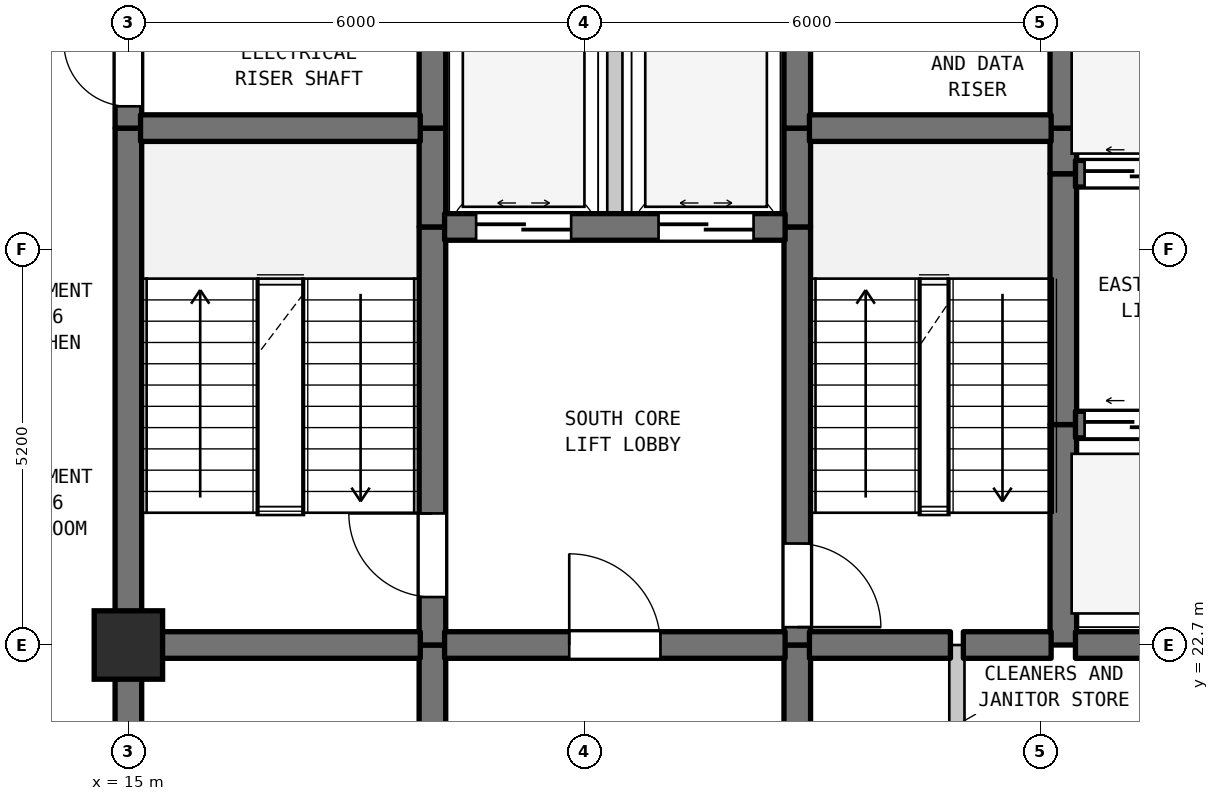
"""IFC4 building model, lengths in metres.
Left out: names, types, materials, properties, quantities, classifications, styles, units other than length and angle.
Written with IfcOpenShell. Run it as: python <this file> out.ifc"""

import sys

from ifc_helpers import new_model, si_unit, direction, frame, frame_2d, origin, origin_2d, place, context, subcontext, project, spatial, rectangle, extrude, element, fill, save


model = new_model("IFC4")
c1 = context("Model", 3, precision=1e-05, world=origin(), true_north=direction((0.0, 1.0)))
c2 = subcontext(c1, "Body", "Model", "MODEL_VIEW")
j1 = project(units=[si_unit("LENGTHUNIT", "METRE"), si_unit("PLANEANGLEUNIT", "RADIAN")], contexts=[c1])
p1 = place(None, origin())
s1 = spatial("IfcSite", under=j1, at=p1, CompositionType="ELEMENT")
p2 = place(p1, origin())
s2 = spatial("IfcBuilding", under=s1, at=p2, CompositionType="ELEMENT")
p3 = place(p2, frame((0.0, 0.0, 164.6)))
s3 = spatial("IfcBuildingStorey", under=s2, at=p3, CompositionType="ELEMENT", Elevation=164.6)
p4 = place(p3, frame((15.0, 22.7, 0.0), z_axis=(0.0, 0.0, 1.0), x_axis=(1.0, 0.0, 0.0)))
e1 = element("IfcColumn", 1, at=p4, inside=s3, PredefinedType="COLUMN", context=c2, shape_type="SweptSolid", body=[
    extrude(rectangle(XDim=0.9, YDim=0.9, at=origin_2d()), origin(), (0.0, 0.0, 1.0), 4.5),
])
p5 = place(p3, frame((15.0, 19.5, 0.0), z_axis=(0.0, 0.0, 1.0), x_axis=(0.0, 1.0, 0.0)))
e2 = element("IfcWall", 2, at=p5, inside=s3, PredefinedType="SHEAR", context=c2, shape_type="SweptSolid", body=[
    extrude(rectangle(XDim=3.2, YDim=0.35, at=frame_2d((1.6, 0.0))), origin(), (0.0, 0.0, 1.0), 4.19),
])
p6 = place(p3, frame((15.0, 22.7, 0.0), z_axis=(0.0, 0.0, 1.0), x_axis=(0.0, 1.0, 0.0)))
e3 = element("IfcWall", 3, at=p6, inside=s3, PredefinedType="SHEAR", context=c2, shape_type="SweptSolid", body=[
    extrude(rectangle(XDim=6.8, YDim=0.35, at=frame_2d((3.4, 0.0))), origin(), (0.0, 0.0, 1.0), 4.19),
])
p7 = place(p3, frame((15.0, 29.5, 0.0), z_axis=(0.0, 0.0, 1.0), x_axis=(0.0, 1.0, 0.0)))
e4 = element("IfcWall", 4, at=p7, inside=s3, PredefinedType="SHEAR", context=c2, shape_type="SweptSolid", body=[
    extrude(rectangle(XDim=1.6, YDim=0.35, at=frame_2d((0.8, 0.0))), origin(), (0.0, 0.0, 1.0), 4.19),
])
p8 = place(p7, frame((0.287, 0.0, 0.0)))
e5 = element("IfcOpeningElement", 5, at=p8, cuts=e4, PredefinedType="OPENING", context=c2, shape_type="SweptSolid", body=[
    extrude(rectangle(XDim=0.85, YDim=2.1, at=frame_2d((0.425, 1.05))), frame((0.0, 0.185, 0.0), z_axis=(0.0, -1.0, 0.0), x_axis=(1.0, 0.0, 0.0)), (0.0, 0.0, 1.0), 0.37),
])
p9 = place(p3, frame((19.0, 19.5, 0.0), z_axis=(0.0, 0.0, 1.0), x_axis=(0.0, 1.0, 0.0)))
e6 = element("IfcWall", 6, at=p9, inside=s3, PredefinedType="SHEAR", context=c2, shape_type="SweptSolid", body=[
    extrude(rectangle(XDim=3.2, YDim=0.35, at=frame_2d((1.6, 0.0))), origin(), (0.0, 0.0, 1.0), 4.19),
])
p10 = place(p3, frame((19.0, 22.7, 0.0), z_axis=(0.0, 0.0, 1.0), x_axis=(0.0, 1.0, 0.0)))
e7 = element("IfcWall", 7, at=p10, inside=s3, PredefinedType="SHEAR", context=c2, shape_type="SweptSolid", body=[
    extrude(rectangle(XDim=5.5, YDim=0.35, at=frame_2d((2.75, 0.0))), origin(), (0.0, 0.0, 1.0), 4.19),
])
p11 = place(p10, frame((0.631, 0.0, 0.0)))
e8 = element("IfcOpeningElement", 8, at=p11, cuts=e7, PredefinedType="OPENING", context=c2, shape_type="SweptSolid", body=[
    extrude(rectangle(XDim=1.1, YDim=2.15, at=frame_2d((0.55, 1.075))), frame((0.0, 0.185, 0.0), z_axis=(0.0, -1.0, 0.0), x_axis=(1.0, 0.0, 0.0)), (0.0, 0.0, 1.0), 0.37),
])
p12 = place(p3, frame((19.0, 28.2, 0.0), z_axis=(0.0, 0.0, 1.0), x_axis=(0.0, 1.0, 0.0)))
e9 = element("IfcWall", 9, at=p12, inside=s3, PredefinedType="SHEAR", context=c2, shape_type="SweptSolid", body=[
    extrude(rectangle(XDim=1.3, YDim=0.35, at=frame_2d((0.65, 0.0))), origin(), (0.0, 0.0, 1.0), 4.19),
])
p13 = place(p3, frame((19.0, 29.5, 0.0), z_axis=(0.0, 0.0, 1.0), x_axis=(0.0, 1.0, 0.0)))
e10 = element("IfcWall", 10, at=p13, inside=s3, PredefinedType="SHEAR", context=c2, shape_type="SweptSolid", body=[
    extrude(rectangle(XDim=5.5, YDim=0.35, at=frame_2d((2.75, 0.0))), origin(), (0.0, 0.0, 1.0), 4.19),
])
p14 = place(p13, frame((2.025, 0.0, 0.0)))
e11 = element("IfcOpeningElement", 11, at=p14, cuts=e10, PredefinedType="OPENING", context=c2, shape_type="SweptSolid", body=[
    extrude(rectangle(XDim=1.1, YDim=2.15, at=frame_2d((0.55, 1.075))), frame((0.0, 0.185, 0.0), z_axis=(0.0, -1.0, 0.0), x_axis=(1.0, 0.0, 0.0)), (0.0, 0.0, 1.0), 0.37),
])
p15 = place(p3, frame((21.4, 28.2, 0.0), z_axis=(0.0, 0.0, 1.0), x_axis=(0.0, 1.0, 0.0)))
e12 = element("IfcWall", 12, at=p15, inside=s3, PredefinedType="STANDARD", context=c2, shape_type="SweptSolid", body=[
    extrude(rectangle(XDim=2.6, YDim=0.2, at=frame_2d((1.3, 0.0))), origin(), (0.0, 0.0, 1.0), 4.19),
])
p16 = place(p3, frame((23.8, 19.5, 0.0), z_axis=(0.0, 0.0, 1.0), x_axis=(0.0, 1.0, 0.0)))
e13 = element("IfcWall", 13, at=p16, inside=s3, PredefinedType="SHEAR", context=c2, shape_type="SweptSolid", body=[
    extrude(rectangle(XDim=3.2, YDim=0.35, at=frame_2d((1.6, 0.0))), origin(), (0.0, 0.0, 1.0), 4.19),
])
p17 = place(p3, frame((23.8, 22.7, 0.0), z_axis=(0.0, 0.0, 1.0), x_axis=(0.0, 1.0, 0.0)))
e14 = element("IfcWall", 14, at=p17, inside=s3, PredefinedType="SHEAR", context=c2, shape_type="SweptSolid", body=[
    extrude(rectangle(XDim=5.5, YDim=0.35, at=frame_2d((2.75, 0.0))), origin(), (0.0, 0.0, 1.0), 4.19),
])
p18 = place(p17, frame((0.235, 0.0, 0.0)))
e15 = element("IfcOpeningElement", 15, at=p18, cuts=e14, PredefinedType="OPENING", context=c2, shape_type="SweptSolid", body=[
    extrude(rectangle(XDim=1.1, YDim=2.15, at=frame_2d((0.55, 1.075))), frame((0.0, 0.185, 0.0), z_axis=(0.0, -1.0, 0.0), x_axis=(1.0, 0.0, 0.0)), (0.0, 0.0, 1.0), 0.37),
])
for number, where, z_axis, x_axis in (
    (16, (23.8, 28.2, 0.0), (0.0, 0.0, 1.0), (0.0, 1.0, 0.0)),
    (17, (23.8, 29.5, 0.0), (0.0, 0.0, 1.0), (0.0, 1.0, 0.0)),
):
    element("IfcWall", number, at=place(p3, frame(where, z_axis=z_axis, x_axis=x_axis)), inside=s3, PredefinedType="SHEAR", context=c2, shape_type="SweptSolid", body=[
        extrude(rectangle(XDim=1.3, YDim=0.35, at=frame_2d((0.65, 0.0))), origin(), (0.0, 0.0, 1.0), 4.19),
    ])
p19 = place(p3, frame((25.9, 19.5, 0.0), z_axis=(0.0, 0.0, 1.0), x_axis=(0.0, 1.0, 0.0)))
e18 = element("IfcWall", 18, at=p19, inside=s3, PredefinedType="STANDARD", context=c2, shape_type="SweptSolid", body=[
    extrude(rectangle(XDim=3.2, YDim=0.2, at=frame_2d((1.6, 0.0))), origin(), (0.0, 0.0, 1.0), 4.19),
])
p20 = place(p3, frame((27.3, 22.7, 0.0), z_axis=(0.0, 0.0, 1.0), x_axis=(0.0, 1.0, 0.0)))
e19 = element("IfcWall", 19, at=p20, inside=s3, PredefinedType="SHEAR", context=c2, shape_type="SweptSolid", body=[
    extrude(rectangle(XDim=2.9, YDim=0.35, at=frame_2d((1.45, 0.0))), origin(), (0.0, 0.0, 1.0), 4.19),
])
p21 = place(p3, frame((27.3, 25.6, 0.0), z_axis=(0.0, 0.0, 1.0), x_axis=(0.0, 1.0, 0.0)))
e20 = element("IfcWall", 20, at=p21, inside=s3, PredefinedType="SHEAR", context=c2, shape_type="SweptSolid", body=[
    extrude(rectangle(XDim=3.3, YDim=0.35, at=frame_2d((1.65, 0.0))), origin(), (0.0, 0.0, 1.0), 4.19),
])
p22 = place(p3, frame((27.3, 28.9, 0.0), z_axis=(0.0, 0.0, 1.0), x_axis=(0.0, 1.0, 0.0)))
e21 = element("IfcWall", 21, at=p22, inside=s3, PredefinedType="SHEAR", context=c2, shape_type="SweptSolid", body=[
    extrude(rectangle(XDim=0.6, YDim=0.35, at=frame_2d((0.3, 0.0))), origin(), (0.0, 0.0, 1.0), 4.19),
])
p23 = place(p3, frame((27.3, 29.5, 0.0), z_axis=(0.0, 0.0, 1.0), x_axis=(0.0, 1.0, 0.0)))
e22 = element("IfcWall", 22, at=p23, inside=s3, PredefinedType="SHEAR", context=c2, shape_type="SweptSolid", body=[
    extrude(rectangle(XDim=2.0, YDim=0.35, at=frame_2d((1.0, 0.0))), origin(), (0.0, 0.0, 1.0), 4.19),
])
p24 = place(p3, frame((15.16, 22.7, 0.0), z_axis=(0.0, 0.0, 1.0), x_axis=(1.0, 0.0, 0.0)))
e23 = element("IfcWall", 23, at=p24, inside=s3, PredefinedType="SHEAR", context=c2, shape_type="SweptSolid", body=[
    extrude(rectangle(XDim=3.68, YDim=0.35, at=frame_2d((1.84, 0.0))), origin(), (0.0, 0.0, 1.0), 4.19),
])
p25 = place(p3, frame((19.16, 22.7, 0.0), z_axis=(0.0, 0.0, 1.0), x_axis=(1.0, 0.0, 0.0)))
e24 = element("IfcWall", 24, at=p25, inside=s3, PredefinedType="SHEAR", context=c2, shape_type="SweptSolid", body=[
    extrude(rectangle(XDim=4.48, YDim=0.35, at=frame_2d((2.24, 0.0))), origin(), (0.0, 0.0, 1.0), 4.19),
])
p26 = place(p25, frame((1.64, 0.0, 0.0)))
e25 = element("IfcOpeningElement", 25, at=p26, cuts=e24, PredefinedType="OPENING", context=c2, shape_type="SweptSolid", body=[
    extrude(rectangle(XDim=1.2, YDim=2.2, at=frame_2d((0.6, 1.1))), frame((0.0, 0.185, 0.0), z_axis=(0.0, -1.0, 0.0), x_axis=(1.0, 0.0, 0.0)), (0.0, 0.0, 1.0), 0.37),
])
p27 = place(p3, frame((23.96, 22.7, 0.0), z_axis=(0.0, 0.0, 1.0), x_axis=(1.0, 0.0, 0.0)))
e26 = element("IfcWall", 26, at=p27, inside=s3, PredefinedType="SHEAR", context=c2, shape_type="SweptSolid", body=[
    extrude(rectangle(XDim=1.855, YDim=0.35, at=frame_2d((0.927, 0.0))), origin(), (0.0, 0.0, 1.0), 4.19),
])
p28 = place(p3, frame((25.985, 22.7, 0.0), z_axis=(0.0, 0.0, 1.0), x_axis=(1.0, 0.0, 0.0)))
e27 = element("IfcWall", 27, at=p28, inside=s3, PredefinedType="SHEAR", context=c2, shape_type="SweptSolid", body=[
    extrude(rectangle(XDim=1.155, YDim=0.35, at=frame_2d((0.577, 0.0))), origin(), (0.0, 0.0, 1.0), 4.19),
])
p29 = place(p3, frame((27.46, 22.7, 0.0), z_axis=(0.0, 0.0, 1.0), x_axis=(1.0, 0.0, 0.0)))
e28 = element("IfcWall", 28, at=p29, inside=s3, PredefinedType="SHEAR", context=c2, shape_type="SweptSolid", body=[
    extrude(rectangle(XDim=3.18, YDim=0.35, at=frame_2d((1.59, 0.0))), origin(), (0.0, 0.0, 1.0), 4.19),
])
p30 = place(p3, frame((27.46, 25.6, 0.0), z_axis=(0.0, 0.0, 1.0), x_axis=(1.0, 0.0, 0.0)))
e29 = element("IfcWall", 29, at=p30, inside=s3, PredefinedType="SHEAR", context=c2, shape_type="SweptSolid", body=[
    extrude(rectangle(XDim=3.18, YDim=0.35, at=frame_2d((1.59, 0.0))), origin(), (0.0, 0.0, 1.0), 4.19),
])
p31 = place(p30, frame((0.12, 0.0, 0.0)))
e30 = element("IfcOpeningElement", 30, at=p31, cuts=e29, PredefinedType="OPENING", context=c2, shape_type="SweptSolid", body=[
    extrude(rectangle(XDim=1.25, YDim=2.2, at=frame_2d((0.625, 1.1))), frame((0.0, 0.185, 0.0), z_axis=(0.0, -1.0, 0.0), x_axis=(1.0, 0.0, 0.0)), (0.0, 0.0, 1.0), 0.37),
])
p32 = place(p30, frame((1.81, 0.0, 0.0)))
e31 = element("IfcOpeningElement", 31, at=p32, cuts=e29, PredefinedType="OPENING", context=c2, shape_type="SweptSolid", body=[
    extrude(rectangle(XDim=1.25, YDim=2.2, at=frame_2d((0.625, 1.1))), frame((0.0, 0.185, 0.0), z_axis=(0.0, -1.0, 0.0), x_axis=(1.0, 0.0, 0.0)), (0.0, 0.0, 1.0), 0.37),
])
p33 = place(p3, frame((19.16, 28.2, 0.0), z_axis=(0.0, 0.0, 1.0), x_axis=(1.0, 0.0, 0.0)))
e32 = element("IfcWall", 32, at=p33, inside=s3, PredefinedType="SHEAR", context=c2, shape_type="SweptSolid", body=[
    extrude(rectangle(XDim=4.48, YDim=0.35, at=frame_2d((2.24, 0.0))), origin(), (0.0, 0.0, 1.0), 4.19),
])
p34 = place(p33, frame((0.415, 0.0, 0.0)))
e33 = element("IfcOpeningElement", 33, at=p34, cuts=e32, PredefinedType="OPENING", context=c2, shape_type="SweptSolid", body=[
    extrude(rectangle(XDim=1.25, YDim=2.2, at=frame_2d((0.625, 1.1))), frame((0.0, 0.185, 0.0), z_axis=(0.0, -1.0, 0.0), x_axis=(1.0, 0.0, 0.0)), (0.0, 0.0, 1.0), 0.37),
])
p35 = place(p33, frame((2.815, 0.0, 0.0)))
e34 = element("IfcOpeningElement", 34, at=p35, cuts=e32, PredefinedType="OPENING", context=c2, shape_type="SweptSolid", body=[
    extrude(rectangle(XDim=1.25, YDim=2.2, at=frame_2d((0.625, 1.1))), frame((0.0, 0.185, 0.0), z_axis=(0.0, -1.0, 0.0), x_axis=(1.0, 0.0, 0.0)), (0.0, 0.0, 1.0), 0.37),
])
p36 = place(p3, frame((27.46, 28.9, 0.0), z_axis=(0.0, 0.0, 1.0), x_axis=(1.0, 0.0, 0.0)))
e35 = element("IfcWall", 35, at=p36, inside=s3, PredefinedType="SHEAR", context=c2, shape_type="SweptSolid", body=[
    extrude(rectangle(XDim=3.18, YDim=0.35, at=frame_2d((1.59, 0.0))), origin(), (0.0, 0.0, 1.0), 4.19),
])
p37 = place(p36, frame((0.12, 0.0, 0.0)))
e36 = element("IfcOpeningElement", 36, at=p37, cuts=e35, PredefinedType="OPENING", context=c2, shape_type="SweptSolid", body=[
    extrude(rectangle(XDim=1.25, YDim=2.2, at=frame_2d((0.625, 1.1))), frame((0.0, 0.185, 0.0), z_axis=(0.0, -1.0, 0.0), x_axis=(1.0, 0.0, 0.0)), (0.0, 0.0, 1.0), 0.37),
])
p38 = place(p36, frame((1.81, 0.0, 0.0)))
e37 = element("IfcOpeningElement", 37, at=p38, cuts=e35, PredefinedType="OPENING", context=c2, shape_type="SweptSolid", body=[
    extrude(rectangle(XDim=1.25, YDim=2.2, at=frame_2d((0.625, 1.1))), frame((0.0, 0.185, 0.0), z_axis=(0.0, -1.0, 0.0), x_axis=(1.0, 0.0, 0.0)), (0.0, 0.0, 1.0), 0.37),
])
p39 = place(p3, frame((15.16, 29.5, 0.0), z_axis=(0.0, 0.0, 1.0), x_axis=(1.0, 0.0, 0.0)))
e38 = element("IfcWall", 38, at=p39, inside=s3, PredefinedType="SHEAR", context=c2, shape_type="SweptSolid", body=[
    extrude(rectangle(XDim=3.68, YDim=0.35, at=frame_2d((1.84, 0.0))), origin(), (0.0, 0.0, 1.0), 4.19),
])
p40 = place(p3, frame((23.96, 29.5, 0.0), z_axis=(0.0, 0.0, 1.0), x_axis=(1.0, 0.0, 0.0)))
e39 = element("IfcWall", 39, at=p40, inside=s3, PredefinedType="SHEAR", context=c2, shape_type="SweptSolid", body=[
    extrude(rectangle(XDim=3.18, YDim=0.35, at=frame_2d((1.59, 0.0))), origin(), (0.0, 0.0, 1.0), 4.19),
])
p41 = place(p8, origin())
e40 = element("IfcDoor", 40, at=p41, inside=s3, OperationType="SINGLE_SWING_RIGHT", PredefinedType="DOOR", context=c2, shape_type="SweptSolid", body=[
    extrude(rectangle(XDim=0.85, YDim=2.1, at=frame_2d((0.425, 1.05))), frame((0.0, 0.025, 0.0), z_axis=(0.0, -1.0, 0.0), x_axis=(1.0, 0.0, 0.0)), (0.0, 0.0, 1.0), 0.05),
])
fill(e5, e40)
p42 = place(p11, origin())
e41 = element("IfcDoor", 41, at=p42, inside=s3, OperationType="SINGLE_SWING_RIGHT", PredefinedType="DOOR", context=c2, shape_type="SweptSolid", body=[
    extrude(rectangle(XDim=1.1, YDim=2.15, at=frame_2d((0.55, 1.075))), frame((0.0, 0.025, 0.0), z_axis=(0.0, -1.0, 0.0), x_axis=(1.0, 0.0, 0.0)), (0.0, 0.0, 1.0), 0.05),
])
fill(e8, e41)
p43 = place(p18, frame((1.1, 0.0, 0.0), z_axis=(0.0, 0.0, 1.0), x_axis=(-1.0, 0.0, 0.0)))
e42 = element("IfcDoor", 42, at=p43, inside=s3, OperationType="SINGLE_SWING_LEFT", PredefinedType="DOOR", context=c2, shape_type="SweptSolid", body=[
    extrude(rectangle(XDim=1.1, YDim=2.15, at=frame_2d((0.55, 1.075))), frame((0.0, 0.025, 0.0), z_axis=(0.0, -1.0, 0.0), x_axis=(1.0, 0.0, 0.0)), (0.0, 0.0, 1.0), 0.05),
])
fill(e15, e42)
p44 = place(p26, origin())
e43 = element("IfcDoor", 43, at=p44, inside=s3, OperationType="SINGLE_SWING_LEFT", PredefinedType="DOOR", context=c2, shape_type="SweptSolid", body=[
    extrude(rectangle(XDim=1.2, YDim=2.2, at=frame_2d((0.6, 1.1))), frame((0.0, 0.025, 0.0), z_axis=(0.0, -1.0, 0.0), x_axis=(1.0, 0.0, 0.0)), (0.0, 0.0, 1.0), 0.05),
])
fill(e25, e43)
p45 = place(p31, origin())
e44 = element("IfcDoor", 44, at=p45, inside=s3, OperationType="DOUBLE_DOOR_SLIDING", PredefinedType="DOOR", context=c2, shape_type="SweptSolid", body=[
    extrude(rectangle(XDim=1.25, YDim=2.2, at=frame_2d((0.625, 1.1))), frame((0.0, 0.025, 0.0), z_axis=(0.0, -1.0, 0.0), x_axis=(1.0, 0.0, 0.0)), (0.0, 0.0, 1.0), 0.05),
])
fill(e30, e44)
p46 = place(p34, origin())
e45 = element("IfcDoor", 45, at=p46, inside=s3, OperationType="DOUBLE_DOOR_SLIDING", PredefinedType="DOOR", context=c2, shape_type="SweptSolid", body=[
    extrude(rectangle(XDim=1.25, YDim=2.2, at=frame_2d((0.625, 1.1))), frame((0.0, 0.025, 0.0), z_axis=(0.0, -1.0, 0.0), x_axis=(1.0, 0.0, 0.0)), (0.0, 0.0, 1.0), 0.05),
])
fill(e33, e45)
p47 = place(p35, origin())
e46 = element("IfcDoor", 46, at=p47, inside=s3, OperationType="DOUBLE_DOOR_SLIDING", PredefinedType="DOOR", context=c2, shape_type="SweptSolid", body=[
    extrude(rectangle(XDim=1.25, YDim=2.2, at=frame_2d((0.625, 1.1))), frame((0.0, 0.025, 0.0), z_axis=(0.0, -1.0, 0.0), x_axis=(1.0, 0.0, 0.0)), (0.0, 0.0, 1.0), 0.05),
])
fill(e34, e46)
p48 = place(p37, origin())
e47 = element("IfcDoor", 47, at=p48, inside=s3, OperationType="DOUBLE_DOOR_SLIDING", PredefinedType="DOOR", context=c2, shape_type="SweptSolid", body=[
    extrude(rectangle(XDim=1.25, YDim=2.2, at=frame_2d((0.625, 1.1))), frame((0.0, 0.025, 0.0), z_axis=(0.0, -1.0, 0.0), x_axis=(1.0, 0.0, 0.0)), (0.0, 0.0, 1.0), 0.05),
])
fill(e36, e47)
save(model, sys.argv[1])
